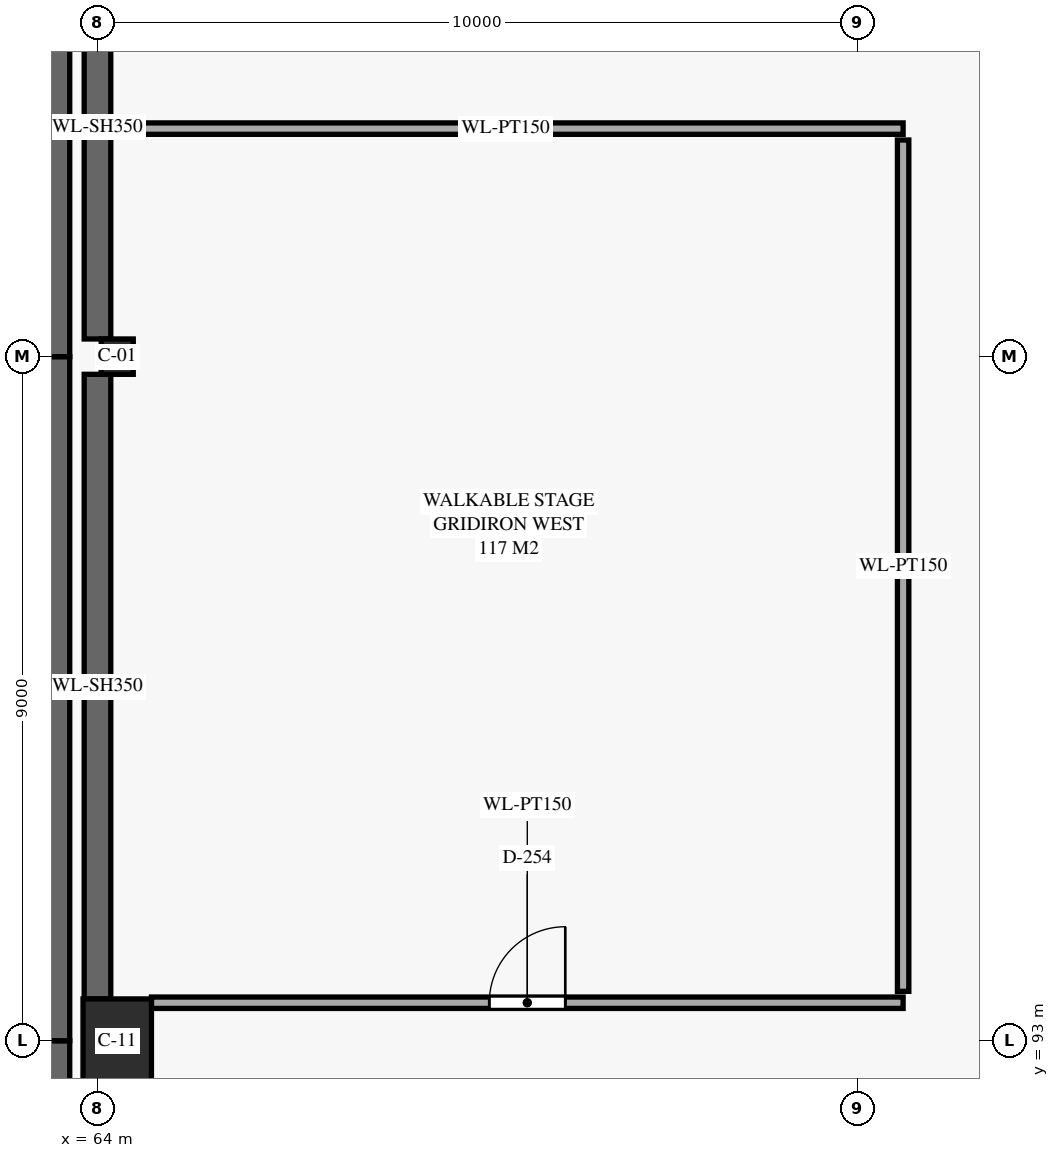
"""IFC4 building model, lengths in metres.
Left out: names, types, materials, properties, quantities, classifications, styles, units other than length and angle.
Written with IfcOpenShell. Run it as: python <this file> out.ifc"""

import sys

from ifc_helpers import new_model, si_unit, direction, frame, frame_2d, origin, origin_2d, place, context, subcontext, project, spatial, rectangle, i_section, extrude, element, fill, save


model = new_model("IFC4")
c1 = context("Model", 3, precision=1e-05, world=origin(), true_north=direction((0.0, 1.0)))
c2 = subcontext(c1, "Body", "Model", "MODEL_VIEW")
j1 = project(units=[si_unit("LENGTHUNIT", "METRE"), si_unit("PLANEANGLEUNIT", "RADIAN")], contexts=[c1])
p1 = place(None, origin())
s1 = spatial("IfcSite", under=j1, at=p1, CompositionType="ELEMENT")
p2 = place(p1, origin())
s2 = spatial("IfcBuilding", under=s1, at=p2, CompositionType="ELEMENT")
p3 = place(p2, frame((0.0, 0.0, 29.6)))
s3 = spatial("IfcBuildingStorey", under=s2, at=p3, CompositionType="ELEMENT", Elevation=29.6)
p4 = place(p3, frame((64.26, 93.0, 0.0), z_axis=(0.0, 0.0, 1.0), x_axis=(1.0, 0.0, 0.0)))
e1 = element("IfcColumn", 1, at=p4, inside=s3, PredefinedType="COLUMN", context=c2, shape_type="SweptSolid", body=[
    extrude(rectangle(XDim=0.9, YDim=1.1, at=origin_2d()), origin(), (0.0, 0.0, 1.0), 4.6),
])
p5 = place(p3, frame((64.26, 102.0, 0.0), z_axis=(0.0, 0.0, 1.0), x_axis=(1.0, 0.0, 0.0)))
e2 = element("IfcColumn", 2, at=p5, inside=s3, PredefinedType="COLUMN", context=c2, shape_type="SweptSolid", body=[
    extrude(i_section(OverallWidth=0.422, OverallDepth=0.465, WebThickness=0.045, FlangeThickness=0.073, FilletRadius=0.02, at=origin_2d()), origin(), (0.0, 0.0, 1.0), 4.6),
])
p6 = place(p3, frame((64.0, 93.55, 0.0), z_axis=(0.0, 0.0, 1.0), x_axis=(0.0, 1.0, 0.0)))
e3 = element("IfcWall", 3, at=p6, inside=s3, PredefinedType="SHEAR", context=c2, shape_type="SweptSolid", body=[
    extrude(rectangle(XDim=8.218, YDim=0.35, at=frame_2d((4.109, 0.0))), origin(), (0.0, 0.0, 1.0), 4.35),
])
p7 = place(p3, frame((64.0, 102.232, 0.0), z_axis=(0.0, 0.0, 1.0), x_axis=(0.0, 1.0, 0.0)))
e4 = element("IfcWall", 4, at=p7, inside=s3, PredefinedType="SHEAR", context=c2, shape_type="SweptSolid", body=[
    extrude(rectangle(XDim=5.568, YDim=0.35, at=frame_2d((2.784, 0.0))), origin(), (0.0, 0.0, 1.0), 4.35),
])
p8 = place(p3, frame((63.46, 83.32, 0.0), z_axis=(0.0, 0.0, 1.0), x_axis=(0.0, 1.0, 0.0)))
e5 = element("IfcWall", 5, at=p8, inside=s3, PredefinedType="SHEAR", context=c2, shape_type="SweptSolid", body=[
    extrude(rectangle(XDim=9.68, YDim=0.35, at=frame_2d((4.84, 0.0))), origin(), (0.0, 0.0, 1.0), 4.35),
])
p9 = place(p3, frame((63.46, 93.0, 0.0), z_axis=(0.0, 0.0, 1.0), x_axis=(0.0, 1.0, 0.0)))
e6 = element("IfcWall", 6, at=p9, inside=s3, PredefinedType="SHEAR", context=c2, shape_type="SweptSolid", body=[
    extrude(rectangle(XDim=9.0, YDim=0.35, at=frame_2d((4.5, 0.0))), origin(), (0.0, 0.0, 1.0), 4.35),
])
p10 = place(p3, frame((63.46, 102.0, 0.0), z_axis=(0.0, 0.0, 1.0), x_axis=(0.0, 1.0, 0.0)))
e7 = element("IfcWall", 7, at=p10, inside=s3, PredefinedType="SHEAR", context=c2, shape_type="SweptSolid", body=[
    extrude(rectangle(XDim=8.0, YDim=0.35, at=frame_2d((4.0, 0.0))), origin(), (0.0, 0.0, 1.0), 4.35),
])
p11 = place(p3, frame((64.71, 93.5, 0.0), z_axis=(0.0, 0.0, 1.0), x_axis=(1.0, 0.0, 0.0)))
e8 = element("IfcWall", 8, at=p11, inside=s3, PredefinedType="PARTITIONING", context=c2, shape_type="SweptSolid", body=[
    extrude(rectangle(XDim=9.89, YDim=0.15, at=frame_2d((4.945, 0.0))), origin(), (0.0, 0.0, 1.0), 4.35),
])
p12 = place(p11, frame((4.445, 0.0, 0.0)))
e9 = element("IfcOpeningElement", 9, at=p12, cuts=e8, PredefinedType="OPENING", context=c2, shape_type="SweptSolid", body=[
    extrude(rectangle(XDim=1.0, YDim=2.15, at=frame_2d((0.5, 1.075))), frame((0.0, 0.085, 0.0), z_axis=(0.0, -1.0, 0.0), x_axis=(1.0, 0.0, 0.0)), (0.0, 0.0, 1.0), 0.17),
])
p13 = place(p3, frame((74.6, 105.0, 0.0), z_axis=(0.0, 0.0, 1.0), x_axis=(-1.0, 0.0, 0.0)))
e10 = element("IfcWall", 10, at=p13, inside=s3, PredefinedType="PARTITIONING", context=c2, shape_type="SweptSolid", body=[
    extrude(rectangle(XDim=10.46, YDim=0.15, at=frame_2d((5.23, 0.0))), origin(), (0.0, 0.0, 1.0), 4.35),
])
p14 = place(p3, frame((74.6, 93.65, 0.0), z_axis=(0.0, 0.0, 1.0), x_axis=(0.0, 1.0, 0.0)))
e11 = element("IfcWall", 11, at=p14, inside=s3, PredefinedType="PARTITIONING", context=c2, shape_type="SweptSolid", body=[
    extrude(rectangle(XDim=11.2, YDim=0.15, at=frame_2d((5.6, 0.0))), origin(), (0.0, 0.0, 1.0), 4.38),
])
p15 = place(p12, origin())
e12 = element("IfcDoor", 12, at=p15, inside=s3, OperationType="SINGLE_SWING_RIGHT", PredefinedType="DOOR", context=c2, shape_type="SweptSolid", body=[
    extrude(rectangle(XDim=1.0, YDim=2.15, at=frame_2d((0.5, 1.075))), frame((0.0, 0.025, 0.0), z_axis=(0.0, -1.0, 0.0), x_axis=(1.0, 0.0, 0.0)), (0.0, 0.0, 1.0), 0.05),
])
fill(e9, e12)
save(model, sys.argv[1])
